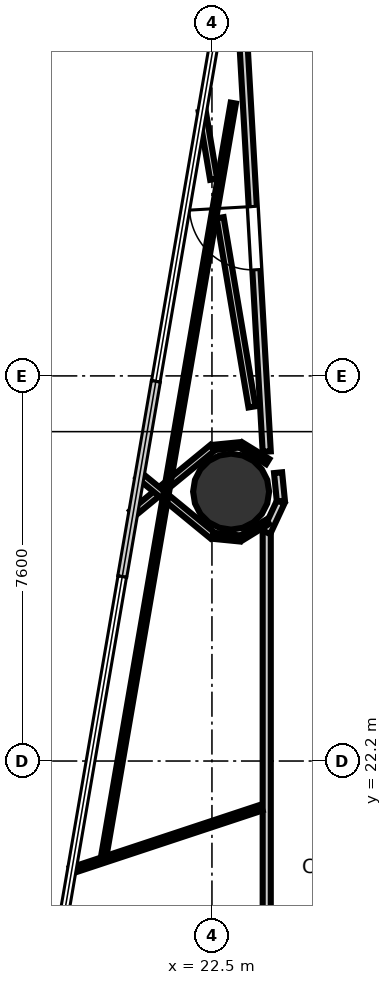
"""IFC4 building model, lengths in metres.
Left out: names, types, materials, properties, quantities, classifications, styles, units other than length and angle.
Written with IfcOpenShell. Run it as: python <this file> out.ifc"""

import sys

from ifc_helpers import new_model, si_unit, direction, frame, frame_2d, origin, origin_2d, place, context, subcontext, project, spatial, rectangle, hollow_circle, extrude, element, fill, save


model = new_model("IFC4")
c1 = context("Model", 3, precision=1e-05, world=origin(), true_north=direction((0.0, 1.0)))
c2 = subcontext(c1, "Body", "Model", "MODEL_VIEW")
j1 = project(units=[si_unit("LENGTHUNIT", "METRE"), si_unit("PLANEANGLEUNIT", "RADIAN")], contexts=[c1])
p1 = place(None, origin())
s1 = spatial("IfcSite", under=j1, at=p1, CompositionType="ELEMENT")
p2 = place(p1, origin())
s2 = spatial("IfcBuilding", under=s1, at=p2, CompositionType="ELEMENT")
p3 = place(p2, frame((0.0, 0.0, 108.9)))
s3 = spatial("IfcBuildingStorey", under=s2, at=p3, CompositionType="ELEMENT", Elevation=108.9)
p4 = place(p3, frame((22.878, 27.516, 0.0), z_axis=(0.0, 0.0, 1.0), x_axis=(1.0, 0.0, 0.0)))
e1 = element("IfcColumn", 1, at=p4, inside=s3, PredefinedType="COLUMN", context=c2, shape_type="SweptSolid", body=[
    extrude(hollow_circle(Radius=0.75, WallThickness=0.036, at=origin_2d()), origin(), (0.0, 0.0, 1.0), 3.7),
])
p5 = place(p3, frame((23.581, 28.307, 0.0), z_axis=(0.0, 0.0, 1.0), x_axis=(-0.056927299401, 0.998378326379, 0.0)))
e2 = element("IfcWall", 2, at=p5, inside=s3, PredefinedType="PARTITIONING", context=c2, shape_type="SweptSolid", body=[
    extrude(rectangle(XDim=10.615, YDim=0.16, at=frame_2d((5.307, 0.0))), origin(), (0.0, 0.0, 1.0), 2.84),
])
p6 = place(p5, frame((3.594, 0.0, 0.0)))
e3 = element("IfcOpeningElement", 3, at=p6, cuts=e2, PredefinedType="OPENING", context=c2, shape_type="SweptSolid", body=[
    extrude(rectangle(XDim=1.25, YDim=2.2, at=frame_2d((0.625, 1.1))), frame((0.0, 0.09, 0.0), z_axis=(0.0, -1.0, 0.0), x_axis=(1.0, 0.0, 0.0)), (0.0, 0.0, 1.0), 0.18),
])
p7 = place(p3, frame((23.581, 18.15, 0.0), z_axis=(0.0, 0.0, 1.0), x_axis=(0.0, 1.0, 0.0)))
e4 = element("IfcWall", 4, at=p7, inside=s3, PredefinedType="PARTITIONING", context=c2, shape_type="SweptSolid", body=[
    extrude(rectangle(XDim=8.575, YDim=0.16, at=frame_2d((4.288, 0.0))), origin(), (0.0, 0.0, 1.0), 2.84),
])
p8 = place(p3, frame((23.578, 26.712, 0.0), z_axis=(0.0, 0.0, 1.0), x_axis=(0.421251946418, 0.906943657367, 0.0)))
e5 = element("IfcWall", 5, at=p8, inside=s3, PredefinedType="PARTITIONING", context=c2, shape_type="SweptSolid", body=[
    extrude(rectangle(XDim=0.663, YDim=0.16, at=frame_2d((0.332, 0.0))), origin(), (0.0, 0.0, 1.0), 2.84),
])
p9 = place(p3, frame((23.86, 27.33, 0.0), z_axis=(0.0, 0.0, 1.0), x_axis=(-0.098000919071, 0.995186324193, 0.0)))
e6 = element("IfcWall", 6, at=p9, inside=s3, PredefinedType="PARTITIONING", context=c2, shape_type="SweptSolid", body=[
    extrude(rectangle(XDim=0.563, YDim=0.16, at=frame_2d((0.281, 0.0))), origin(), (0.0, 0.0, 1.0), 2.84),
])
p10 = place(p3, frame((19.713, 20.034, 0.0), z_axis=(0.0, 0.0, 1.0), x_axis=(0.949321292103, 0.314307308793, 0.0)))
e7 = element("IfcWall", 7, at=p10, inside=s3, PredefinedType="PARTITIONING", context=c2, shape_type="SweptSolid", body=[
    extrude(rectangle(XDim=3.968, YDim=0.12, at=frame_2d((1.984, 0.0))), origin(), (0.0, 0.0, 1.0), 2.84),
])
p11 = place(p3, frame((23.6, 28.11, 0.0), z_axis=(0.0, 0.0, 1.0), x_axis=(-0.851712341449, 0.524009625316, 0.0)))
e8 = element("IfcWall", 8, at=p11, inside=s3, PredefinedType="PARTITIONING", context=c2, shape_type="SweptSolid", body=[
    extrude(rectangle(XDim=0.621, YDim=0.12, at=frame_2d((0.31, 0.0))), origin(), (0.0, 0.0, 1.0), 2.84),
])
p12 = place(p3, frame((23.052, 28.439, 0.0), z_axis=(0.0, 0.0, 1.0), x_axis=(-0.995191506225, -0.09794828195, 0.0)))
e9 = element("IfcWall", 9, at=p12, inside=s3, PredefinedType="PARTITIONING", context=c2, shape_type="SweptSolid", body=[
    extrude(rectangle(XDim=0.528, YDim=0.105, at=frame_2d((0.264, 0.0))), origin(), (0.0, 0.0, 1.0), 2.84),
])
p13 = place(p3, frame((22.51, 28.381, 0.0), z_axis=(0.0, 0.0, 1.0), x_axis=(-0.772998253564, -0.63440814937, 0.0)))
e10 = element("IfcWall", 10, at=p13, inside=s3, PredefinedType="PARTITIONING", context=c2, shape_type="SweptSolid", body=[
    extrude(rectangle(XDim=2.043, YDim=0.14, at=frame_2d((1.022, 0.0))), origin(), (0.0, 0.0, 1.0), 2.84),
])
p14 = place(p3, frame((21.057, 27.844, 0.0), z_axis=(0.0, 0.0, 1.0), x_axis=(0.772990083311, -0.634418104331, 0.0)))
e11 = element("IfcWall", 11, at=p14, inside=s3, PredefinedType="PARTITIONING", context=c2, shape_type="SweptSolid", body=[
    extrude(rectangle(XDim=1.88, YDim=0.14, at=frame_2d((0.94, 0.0))), origin(), (0.0, 0.0, 1.0), 2.84),
])
p15 = place(p3, frame((22.527, 26.644, 0.0), z_axis=(0.0, 0.0, 1.0), x_axis=(0.995191506225, -0.09794828195, 0.0)))
e12 = element("IfcWall", 12, at=p15, inside=s3, PredefinedType="PARTITIONING", context=c2, shape_type="SweptSolid", body=[
    extrude(rectangle(XDim=0.528, YDim=0.12, at=frame_2d((0.264, 0.0))), origin(), (0.0, 0.0, 1.0), 2.84),
])
p16 = place(p3, frame((23.072, 26.597, 0.0), z_axis=(0.0, 0.0, 1.0), x_axis=(0.851536753009, 0.524294915363, 0.0)))
e13 = element("IfcWall", 13, at=p16, inside=s3, PredefinedType="PARTITIONING", context=c2, shape_type="SweptSolid", body=[
    extrude(rectangle(XDim=0.621, YDim=0.105, at=frame_2d((0.31, 0.0))), origin(), (0.0, 0.0, 1.0), 2.84),
])
p17 = place(p3, frame((20.371, 20.358, 0.0), z_axis=(0.0, 0.0, 1.0), x_axis=(0.169525939527, 0.985525725604, 0.0)))
e14 = element("IfcWall", 14, at=p17, inside=s3, PredefinedType="PARTITIONING", context=c2, shape_type="SweptSolid", body=[
    extrude(rectangle(XDim=15.044, YDim=0.105, at=frame_2d((7.522, 0.0))), origin(), (0.0, 0.0, 1.0), 2.84),
])
p18 = place(p3, frame((22.662, 32.921, 0.0), z_axis=(0.0, 0.0, 1.0), x_axis=(0.166124935367, -0.98610471343, 0.0)))
e15 = element("IfcWall", 15, at=p18, inside=s3, PredefinedType="PARTITIONING", context=c2, shape_type="SweptSolid", body=[
    extrude(rectangle(XDim=3.784, YDim=0.14, at=frame_2d((1.892, 0.0))), origin(), (0.0, 0.0, 1.0), 2.84),
])
p19 = place(p3, frame((22.308, 35.017, 0.0), z_axis=(0.0, 0.0, 1.0), x_axis=(0.166093075261, -0.98611008024, 0.0)))
e16 = element("IfcWall", 16, at=p19, inside=s3, PredefinedType="PARTITIONING", context=c2, shape_type="SweptSolid", body=[
    extrude(rectangle(XDim=1.355, YDim=0.14, at=frame_2d((0.678, 0.0))), origin(), (0.0, 0.0, 1.0), 2.84),
])
p20 = place(p6, origin())
e17 = element("IfcDoor", 17, at=p20, inside=s3, OperationType="SINGLE_SWING_RIGHT", PredefinedType="DOOR", context=c2, shape_type="SweptSolid", body=[
    extrude(rectangle(XDim=1.25, YDim=2.2, at=frame_2d((0.625, 1.1))), frame((0.0, 0.025, 0.0), z_axis=(0.0, -1.0, 0.0), x_axis=(1.0, 0.0, 0.0)), (0.0, 0.0, 1.0), 0.05),
])
fill(e3, e17)
save(model, sys.argv[1])
